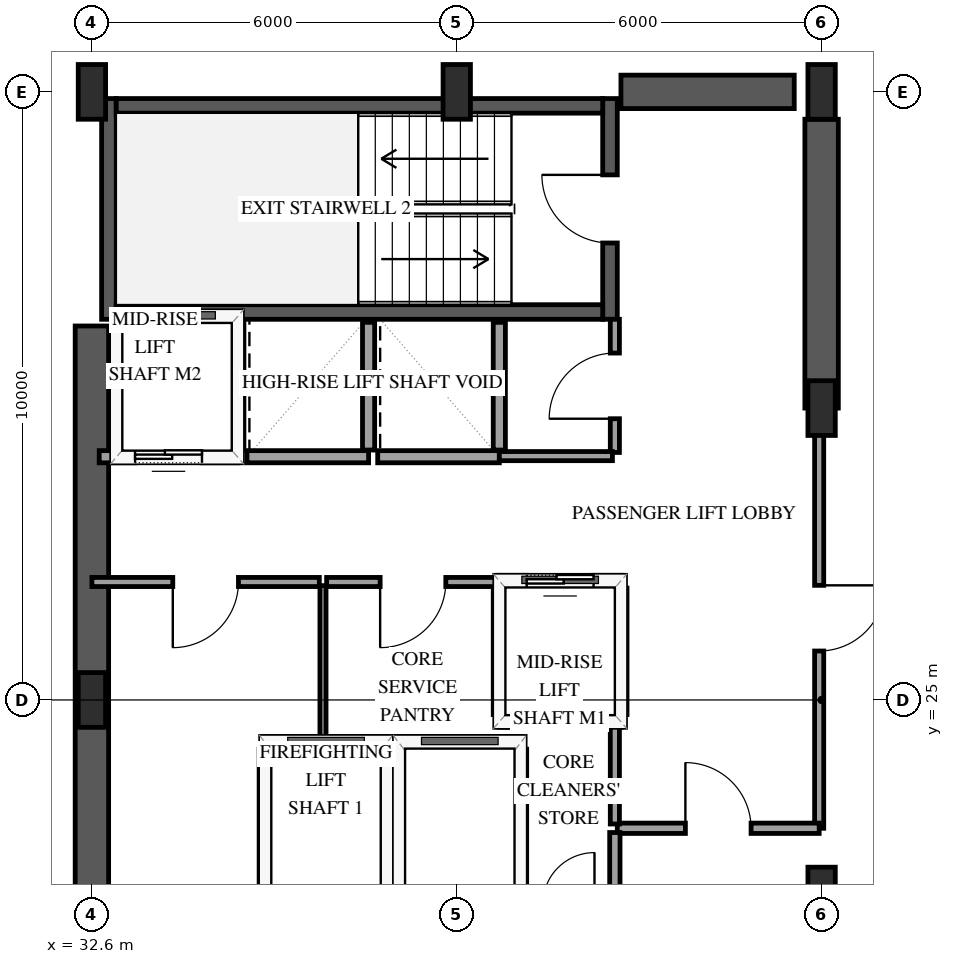
"""IFC4 building model, lengths in metres.
Left out: names, types, materials, properties, quantities, classifications, styles, units other than length and angle.
Written with IfcOpenShell. Run it as: python <this file> out.ifc"""

import sys

from ifc_helpers import new_model, si_unit, direction, frame, frame_2d, origin, origin_2d, place, context, subcontext, project, spatial, rectangle, extrude, element, fill, save


model = new_model("IFC4")
c1 = context("Model", 3, precision=1e-05, world=origin(), true_north=direction((0.0, 1.0)))
c2 = subcontext(c1, "Body", "Model", "MODEL_VIEW")
j1 = project(units=[si_unit("LENGTHUNIT", "METRE"), si_unit("PLANEANGLEUNIT", "RADIAN")], contexts=[c1])
p1 = place(None, origin())
s1 = spatial("IfcSite", under=j1, at=p1, CompositionType="ELEMENT")
p2 = place(p1, origin())
s2 = spatial("IfcBuilding", under=s1, at=p2, CompositionType="ELEMENT")
p3 = place(p2, frame((0.0, 0.0, 149.8)))
s3 = spatial("IfcBuildingStorey", under=s2, at=p3, CompositionType="ELEMENT", Elevation=149.8)
p4 = place(p3, frame((32.88, 31.26, 0.0), z_axis=(0.0, 0.0, 1.0), x_axis=(0.0, 1.0, 0.0)))
e1 = element("IfcWall", 1, at=p4, inside=s3, PredefinedType="SHEAR", context=c2, shape_type="SweptSolid", body=[
    extrude(rectangle(XDim=3.63, YDim=0.24, at=frame_2d((1.815, 0.0))), origin(), (0.0, 0.0, 1.0), 3.6),
])
p5 = place(p3, frame((41.12, 31.26, 0.0), z_axis=(0.0, 0.0, 1.0), x_axis=(0.0, 1.0, 0.0)))
e2 = element("IfcWall", 2, at=p5, inside=s3, PredefinedType="SHEAR", context=c2, shape_type="SweptSolid", body=[
    extrude(rectangle(XDim=3.63, YDim=0.24, at=frame_2d((1.815, 0.0))), origin(), (0.0, 0.0, 1.0), 3.6),
])
p6 = place(p5, frame((1.255, 0.0, 0.0)))
e3 = element("IfcOpeningElement", 3, at=p6, cuts=e2, PredefinedType="OPENING", context=c2, shape_type="SweptSolid", body=[
    extrude(rectangle(XDim=1.12, YDim=2.15, at=frame_2d((0.56, 1.075))), frame((0.0, 0.13, 0.0), z_axis=(0.0, -1.0, 0.0), x_axis=(1.0, 0.0, 0.0)), (0.0, 0.0, 1.0), 0.26),
])
for number, where, z_axis, x_axis in (
    (4, (33.0, 31.38, 0.0), (0.0, 0.0, 1.0), (1.0, 0.0, 0.0)),
    (5, (33.0, 34.77, 0.0), (0.0, 0.0, 1.0), (1.0, 0.0, 0.0)),
):
    element("IfcWall", number, at=place(p3, frame(where, z_axis=z_axis, x_axis=x_axis)), inside=s3, PredefinedType="SHEAR", context=c2, shape_type="SweptSolid", body=[
        extrude(rectangle(XDim=8.0, YDim=0.24, at=frame_2d((4.0, 0.0))), origin(), (0.0, 0.0, 1.0), 3.6),
    ])
p7 = place(p3, frame((32.6, 18.85, 0.0), z_axis=(0.0, 0.0, 1.0), x_axis=(0.0, 1.0, 0.0)))
e6 = element("IfcWall", 6, at=p7, inside=s3, PredefinedType="SHEAR", context=c2, shape_type="SweptSolid", body=[
    extrude(rectangle(XDim=12.3, YDim=0.55, at=frame_2d((6.15, 0.0))), origin(), (0.0, 0.0, 1.0), 3.6),
])
p8 = place(p3, frame((41.3, 35.0, 0.0), z_axis=(0.0, 0.0, 1.0), x_axis=(1.0, 0.0, 0.0)))
e7 = element("IfcWall", 7, at=p8, inside=s3, PredefinedType="SHEAR", context=c2, shape_type="SweptSolid", body=[
    extrude(rectangle(XDim=2.85, YDim=0.55, at=frame_2d((1.425, 0.0))), origin(), (0.0, 0.0, 1.0), 3.6),
])
p9 = place(p3, frame((44.6, 29.8, 0.0), z_axis=(0.0, 0.0, 1.0), x_axis=(0.0, 1.0, 0.0)))
e8 = element("IfcWall", 8, at=p9, inside=s3, PredefinedType="SHEAR", context=c2, shape_type="SweptSolid", body=[
    extrude(rectangle(XDim=4.75, YDim=0.55, at=frame_2d((2.375, 0.0))), origin(), (0.0, 0.0, 1.0), 3.6),
])
for number, where, z_axis, x_axis in (
    (9, (32.6, 25.0, 0.0), (0.0, 0.0, 1.0), (1.0, 0.0, 0.0)),
    (10, (32.6, 35.0, 0.0), (0.0, 0.0, 1.0), (1.0, 0.0, 0.0)),
    (11, (38.6, 35.0, 0.0), (0.0, 0.0, 1.0), (1.0, 0.0, 0.0)),
    (12, (44.6, 21.8, 0.0), (0.0, 0.0, 1.0), (1.0, 0.0, 0.0)),
    (13, (44.6, 29.8, 0.0), (0.0, 0.0, 1.0), (1.0, 0.0, 0.0)),
    (14, (44.6, 35.0, 0.0), (0.0, 0.0, 1.0), (1.0, 0.0, 0.0)),
):
    element("IfcColumn", number, at=place(p3, frame(where, z_axis=z_axis, x_axis=x_axis)), inside=s3, PredefinedType="PILASTER", context=c2, shape_type="SweptSolid", body=[
        extrude(rectangle(XDim=0.45, YDim=0.9, at=origin_2d()), origin(), (0.0, 0.0, 1.0), 3.6),
    ])
p10 = place(p3, frame((32.08, 37.935, 0.0), z_axis=(0.0, 0.0, 1.0), x_axis=(-0.647858622498, -0.761760595762, 0.0)))
e15 = element("IfcWall", 15, at=p10, inside=s3, PredefinedType="SOLIDWALL", context=c2, shape_type="SweptSolid", body=[
    extrude(rectangle(XDim=2.967, YDim=0.27, at=frame_2d((1.483, 0.0))), origin(), (0.0, 0.0, 1.0), 2.679),
])
p11 = place(p3, frame((35.45, 24.3, 0.0), z_axis=(0.0, 0.0, 1.0), x_axis=(1.0, 0.0, 0.0)))
e16 = element("IfcWall", 16, at=p11, inside=s3, PredefinedType="SOLIDWALL", context=c2, shape_type="SweptSolid", body=[
    extrude(rectangle(XDim=2.0, YDim=0.2, at=frame_2d((1.0, 0.0))), origin(), (0.0, 0.0, 1.0), 3.3),
])
for number, where, z_axis, x_axis in (
    (17, (35.45, 21.81, 0.0), (0.0, 0.0, 1.0), (0.0, 1.0, 0.0)),
    (18, (37.45, 21.81, 0.0), (0.0, 0.0, 1.0), (0.0, 1.0, 0.0)),
):
    element("IfcWall", number, at=place(p3, frame(where, z_axis=z_axis, x_axis=x_axis)), inside=s3, PredefinedType="SOLIDWALL", context=c2, shape_type="SweptSolid", body=[
        extrude(rectangle(XDim=2.38, YDim=0.2, at=frame_2d((1.19, 0.0))), origin(), (0.0, 0.0, 1.0), 3.3),
    ])
p12 = place(p3, frame((37.65, 24.3, 0.0), z_axis=(0.0, 0.0, 1.0), x_axis=(1.0, 0.0, 0.0)))
e19 = element("IfcWall", 19, at=p12, inside=s3, PredefinedType="SOLIDWALL", context=c2, shape_type="SweptSolid", body=[
    extrude(rectangle(XDim=2.0, YDim=0.2, at=frame_2d((1.0, 0.0))), origin(), (0.0, 0.0, 1.0), 3.3),
])
p13 = place(p3, frame((39.65, 21.81, 0.0), z_axis=(0.0, 0.0, 1.0), x_axis=(0.0, 1.0, 0.0)))
e20 = element("IfcWall", 20, at=p13, inside=s3, PredefinedType="SOLIDWALL", context=c2, shape_type="SweptSolid", body=[
    extrude(rectangle(XDim=2.38, YDim=0.2, at=frame_2d((1.19, 0.0))), origin(), (0.0, 0.0, 1.0), 3.3),
])
p14 = place(p3, frame((39.3, 24.65, 0.0), z_axis=(0.0, 0.0, 1.0), x_axis=(1.0, 0.0, 0.0)))
e21 = element("IfcWall", 21, at=p14, inside=s3, PredefinedType="SOLIDWALL", context=c2, shape_type="SweptSolid", body=[
    extrude(rectangle(XDim=2.0, YDim=0.2, at=frame_2d((1.0, 0.0))), origin(), (0.0, 0.0, 1.0), 3.3),
])
p15 = place(p3, frame((39.3, 26.95, 0.0), z_axis=(0.0, 0.0, 1.0), x_axis=(1.0, 0.0, 0.0)))
e22 = element("IfcWall", 22, at=p15, inside=s3, PredefinedType="SOLIDWALL", context=c2, shape_type="SweptSolid", body=[
    extrude(rectangle(XDim=2.0, YDim=0.2, at=frame_2d((1.0, 0.0))), origin(), (0.0, 0.0, 1.0), 3.3),
])
p16 = place(p15, frame((0.45, 0.0, 0.0)))
e23 = element("IfcOpeningElement", 23, at=p16, cuts=e22, PredefinedType="OPENING", context=c2, shape_type="SweptSolid", body=[
    extrude(rectangle(XDim=1.1, YDim=2.15, at=frame_2d((0.55, 1.075))), frame((0.0, 0.11, 0.0), z_axis=(0.0, -1.0, 0.0), x_axis=(1.0, 0.0, 0.0)), (0.0, 0.0, 1.0), 0.22),
])
for number, where, z_axis, x_axis in (
    (24, (39.3, 24.76, 0.0), (0.0, 0.0, 1.0), (0.0, 1.0, 0.0)),
    (25, (41.3, 24.76, 0.0), (0.0, 0.0, 1.0), (0.0, 1.0, 0.0)),
):
    element("IfcWall", number, at=place(p3, frame(where, z_axis=z_axis, x_axis=x_axis)), inside=s3, PredefinedType="SOLIDWALL", context=c2, shape_type="SweptSolid", body=[
        extrude(rectangle(XDim=2.08, YDim=0.2, at=frame_2d((1.04, 0.0))), origin(), (0.0, 0.0, 1.0), 3.3),
    ])
p17 = place(p3, frame((32.72, 29.0, 0.0), z_axis=(0.0, 0.0, 1.0), x_axis=(1.0, 0.0, 0.0)))
e26 = element("IfcWall", 26, at=p17, inside=s3, PredefinedType="SOLIDWALL", context=c2, shape_type="SweptSolid", body=[
    extrude(rectangle(XDim=2.28, YDim=0.2, at=frame_2d((1.14, 0.0))), origin(), (0.0, 0.0, 1.0), 3.3),
])
p18 = place(p17, frame((0.59, 0.0, 0.0)))
e27 = element("IfcOpeningElement", 27, at=p18, cuts=e26, PredefinedType="OPENING", context=c2, shape_type="SweptSolid", body=[
    extrude(rectangle(XDim=1.1, YDim=2.15, at=frame_2d((0.55, 1.075))), frame((0.0, 0.11, 0.0), z_axis=(0.0, -1.0, 0.0), x_axis=(1.0, 0.0, 0.0)), (0.0, 0.0, 1.0), 0.22),
])
p19 = place(p3, frame((35.0, 29.11, 0.0), z_axis=(0.0, 0.0, 1.0), x_axis=(0.0, 1.0, 0.0)))
e28 = element("IfcWall", 28, at=p19, inside=s3, PredefinedType="SOLIDWALL", context=c2, shape_type="SweptSolid", body=[
    extrude(rectangle(XDim=2.1, YDim=0.2, at=frame_2d((1.05, 0.0))), origin(), (0.0, 0.0, 1.0), 3.3),
])
p20 = place(p3, frame((35.15, 29.0, 0.0), z_axis=(0.0, 0.0, 1.0), x_axis=(1.0, 0.0, 0.0)))
e29 = element("IfcWall", 29, at=p20, inside=s3, PredefinedType="SOLIDWALL", context=c2, shape_type="SweptSolid", body=[
    extrude(rectangle(XDim=2.0, YDim=0.2, at=frame_2d((1.0, 0.0))), origin(), (0.0, 0.0, 1.0), 3.3),
])
p21 = place(p3, frame((37.15, 29.11, 0.0), z_axis=(0.0, 0.0, 1.0), x_axis=(0.0, 1.0, 0.0)))
e30 = element("IfcWall", 30, at=p21, inside=s3, PredefinedType="SOLIDWALL", context=c2, shape_type="SweptSolid", body=[
    extrude(rectangle(XDim=2.1, YDim=0.2, at=frame_2d((1.05, 0.0))), origin(), (0.0, 0.0, 1.0), 3.3),
])
p22 = place(p3, frame((37.3, 29.0, 0.0), z_axis=(0.0, 0.0, 1.0), x_axis=(1.0, 0.0, 0.0)))
e31 = element("IfcWall", 31, at=p22, inside=s3, PredefinedType="SOLIDWALL", context=c2, shape_type="SweptSolid", body=[
    extrude(rectangle(XDim=2.0, YDim=0.2, at=frame_2d((1.0, 0.0))), origin(), (0.0, 0.0, 1.0), 3.3),
])
p23 = place(p3, frame((39.3, 29.11, 0.0), z_axis=(0.0, 0.0, 1.0), x_axis=(0.0, 1.0, 0.0)))
e32 = element("IfcWall", 32, at=p23, inside=s3, PredefinedType="SOLIDWALL", context=c2, shape_type="SweptSolid", body=[
    extrude(rectangle(XDim=2.1, YDim=0.2, at=frame_2d((1.05, 0.0))), origin(), (0.0, 0.0, 1.0), 3.3),
])
p24 = place(p3, frame((44.56, 29.8, 0.0), z_axis=(0.0, 0.0, 1.0), x_axis=(0.0, -1.0, 0.0)))
e33 = element("IfcWall", 33, at=p24, inside=s3, PredefinedType="PARTITIONING", context=c2, shape_type="SweptSolid", body=[
    extrude(rectangle(XDim=6.91, YDim=0.15, at=frame_2d((3.455, 0.0))), origin(), (0.0, 0.0, 1.0), 2.34),
])
p25 = place(p24, frame((2.915, 0.0, 0.0)))
e34 = element("IfcOpeningElement", 34, at=p25, cuts=e33, PredefinedType="OPENING", context=c2, shape_type="SweptSolid", body=[
    extrude(rectangle(XDim=1.08, YDim=2.15, at=frame_2d((0.54, 1.075))), frame((0.0, 0.085, 0.0), z_axis=(0.0, -1.0, 0.0), x_axis=(1.0, 0.0, 0.0)), (0.0, 0.0, 1.0), 0.17),
])
p26 = place(p3, frame((36.34, 26.94, 0.0), z_axis=(0.0, 0.0, 1.0), x_axis=(-1.0, 0.0, 0.0)))
e35 = element("IfcWall", 35, at=p26, inside=s3, PredefinedType="PARTITIONING", context=c2, shape_type="SweptSolid", body=[
    extrude(rectangle(XDim=3.74, YDim=0.15, at=frame_2d((1.87, 0.0))), origin(), (0.0, 0.0, 1.0), 3.3),
])
p27 = place(p26, frame((1.33, 0.0, 0.0)))
e36 = element("IfcOpeningElement", 36, at=p27, cuts=e35, PredefinedType="OPENING", context=c2, shape_type="SweptSolid", body=[
    extrude(rectangle(XDim=1.08, YDim=2.15, at=frame_2d((0.54, 1.075))), frame((0.0, 0.085, 0.0), z_axis=(0.0, -1.0, 0.0), x_axis=(1.0, 0.0, 0.0)), (0.0, 0.0, 1.0), 0.17),
])
p28 = place(p3, frame((41.24, 22.89, 0.0), z_axis=(0.0, 0.0, 1.0), x_axis=(1.0, 0.0, 0.0)))
e37 = element("IfcWall", 37, at=p28, inside=s3, PredefinedType="PARTITIONING", context=c2, shape_type="SweptSolid", body=[
    extrude(rectangle(XDim=3.32, YDim=0.17, at=frame_2d((1.66, 0.0))), origin(), (0.0, 0.0, 1.0), 3.3),
])
p29 = place(p28, frame((1.12, 0.0, 0.0)))
e38 = element("IfcOpeningElement", 38, at=p29, cuts=e37, PredefinedType="OPENING", context=c2, shape_type="SweptSolid", body=[
    extrude(rectangle(XDim=1.08, YDim=2.15, at=frame_2d((0.54, 1.075))), frame((0.0, 0.095, 0.0), z_axis=(0.0, -1.0, 0.0), x_axis=(1.0, 0.0, 0.0)), (0.0, 0.0, 1.0), 0.19),
])
p30 = place(p3, frame((39.3, 26.94, 0.0), z_axis=(0.0, 0.0, 1.0), x_axis=(-1.0, 0.0, 0.0)))
e39 = element("IfcWall", 39, at=p30, inside=s3, PredefinedType="PARTITIONING", context=c2, shape_type="SweptSolid", body=[
    extrude(rectangle(XDim=2.84, YDim=0.15, at=frame_2d((1.42, 0.0))), origin(), (0.0, 0.0, 1.0), 3.3),
])
p31 = place(p30, frame((0.88, 0.0, 0.0)))
e40 = element("IfcOpeningElement", 40, at=p31, cuts=e39, PredefinedType="OPENING", context=c2, shape_type="SweptSolid", body=[
    extrude(rectangle(XDim=1.08, YDim=2.15, at=frame_2d((0.54, 1.075))), frame((0.0, 0.085, 0.0), z_axis=(0.0, -1.0, 0.0), x_axis=(1.0, 0.0, 0.0)), (0.0, 0.0, 1.0), 0.17),
])
p32 = place(p3, frame((36.4, 26.88, 0.0), z_axis=(0.0, 0.0, 1.0), x_axis=(0.0, -1.0, 0.0)))
e41 = element("IfcWall", 41, at=p32, inside=s3, PredefinedType="PARTITIONING", context=c2, shape_type="SweptSolid", body=[
    extrude(rectangle(XDim=2.58, YDim=0.1, at=frame_2d((1.29, 0.0))), origin(), (0.0, 0.0, 1.0), 3.3),
])
p33 = place(p3, frame((41.2, 29.07, 0.0), z_axis=(0.0, 0.0, 1.0), x_axis=(0.0, 1.0, 0.0)))
e42 = element("IfcWall", 42, at=p33, inside=s3, PredefinedType="PARTITIONING", context=c2, shape_type="SweptSolid", body=[
    extrude(rectangle(XDim=2.19, YDim=0.15, at=frame_2d((1.095, 0.0))), origin(), (0.0, 0.0, 1.0), 3.3),
])
p34 = place(p33, frame((0.555, 0.0, 0.0)))
e43 = element("IfcOpeningElement", 43, at=p34, cuts=e42, PredefinedType="OPENING", context=c2, shape_type="SweptSolid", body=[
    extrude(rectangle(XDim=1.08, YDim=2.15, at=frame_2d((0.54, 1.075))), frame((0.0, 0.085, 0.0), z_axis=(0.0, -1.0, 0.0), x_axis=(1.0, 0.0, 0.0)), (0.0, 0.0, 1.0), 0.17),
])
p35 = place(p3, frame((39.3, 29.01, 0.0), z_axis=(0.0, 0.0, 1.0), x_axis=(1.0, 0.0, 0.0)))
e44 = element("IfcWall", 44, at=p35, inside=s3, PredefinedType="PARTITIONING", context=c2, shape_type="SweptSolid", body=[
    extrude(rectangle(XDim=1.86, YDim=0.15, at=frame_2d((0.93, 0.0))), origin(), (0.0, 0.0, 1.0), 3.3),
])
p36 = place(p3, frame((41.2, 22.96, 0.0), z_axis=(0.0, 0.0, 1.0), x_axis=(0.0, 1.0, 0.0)))
e45 = element("IfcWall", 45, at=p36, inside=s3, PredefinedType="PARTITIONING", context=c2, shape_type="SweptSolid", body=[
    extrude(rectangle(XDim=1.69, YDim=0.15, at=frame_2d((0.845, 0.0))), origin(), (0.0, 0.0, 1.0), 3.3),
])
p37 = place(p3, frame((41.2, 21.7, 0.0), z_axis=(0.0, 0.0, 1.0), x_axis=(0.0, 1.0, 0.0)))
e46 = element("IfcWall", 46, at=p37, inside=s3, PredefinedType="PARTITIONING", context=c2, shape_type="SweptSolid", body=[
    extrude(rectangle(XDim=1.12, YDim=0.17, at=frame_2d((0.56, 0.0))), origin(), (0.0, 0.0, 1.0), 3.3),
])
p38 = place(p16, origin())
e47 = element("IfcDoor", 47, at=p38, inside=s3, OperationType="SLIDING_TO_LEFT", PredefinedType="DOOR", context=c2, shape_type="SweptSolid", body=[
    extrude(rectangle(XDim=1.1, YDim=2.15, at=frame_2d((0.55, 1.075))), frame((0.0, 0.025, 0.0), z_axis=(0.0, -1.0, 0.0), x_axis=(1.0, 0.0, 0.0)), (0.0, 0.0, 1.0), 0.05),
])
fill(e23, e47)
p39 = place(p18, origin())
e48 = element("IfcDoor", 48, at=p39, inside=s3, OperationType="SLIDING_TO_LEFT", PredefinedType="DOOR", context=c2, shape_type="SweptSolid", body=[
    extrude(rectangle(XDim=1.1, YDim=2.15, at=frame_2d((0.55, 1.075))), frame((0.0, 0.025, 0.0), z_axis=(0.0, -1.0, 0.0), x_axis=(1.0, 0.0, 0.0)), (0.0, 0.0, 1.0), 0.05),
])
fill(e27, e48)
p40 = place(p6, origin())
e49 = element("IfcDoor", 49, at=p40, inside=s3, OperationType="SINGLE_SWING_RIGHT", PredefinedType="DOOR", context=c2, shape_type="SweptSolid", body=[
    extrude(rectangle(XDim=1.12, YDim=2.15, at=frame_2d((0.56, 1.075))), frame((0.0, 0.025, 0.0), z_axis=(0.0, -1.0, 0.0), x_axis=(1.0, 0.0, 0.0)), (0.0, 0.0, 1.0), 0.05),
])
fill(e3, e49)
p41 = place(p25, origin())
e50 = element("IfcDoor", 50, at=p41, inside=s3, OperationType="SINGLE_SWING_LEFT", PredefinedType="DOOR", context=c2, shape_type="SweptSolid", body=[
    extrude(rectangle(XDim=1.08, YDim=2.15, at=frame_2d((0.54, 1.075))), frame((0.0, 0.025, 0.0), z_axis=(0.0, -1.0, 0.0), x_axis=(1.0, 0.0, 0.0)), (0.0, 0.0, 1.0), 0.05),
])
fill(e34, e50)
p42 = place(p27, origin())
e51 = element("IfcDoor", 51, at=p42, inside=s3, OperationType="SINGLE_SWING_RIGHT", PredefinedType="DOOR", context=c2, shape_type="SweptSolid", body=[
    extrude(rectangle(XDim=1.08, YDim=2.15, at=frame_2d((0.54, 1.075))), frame((0.0, 0.025, 0.0), z_axis=(0.0, -1.0, 0.0), x_axis=(1.0, 0.0, 0.0)), (0.0, 0.0, 1.0), 0.05),
])
fill(e36, e51)
p43 = place(p29, origin())
e52 = element("IfcDoor", 52, at=p43, inside=s3, OperationType="SINGLE_SWING_LEFT", PredefinedType="DOOR", context=c2, shape_type="SweptSolid", body=[
    extrude(rectangle(XDim=1.08, YDim=2.15, at=frame_2d((0.54, 1.075))), frame((0.0, 0.025, 0.0), z_axis=(0.0, -1.0, 0.0), x_axis=(1.0, 0.0, 0.0)), (0.0, 0.0, 1.0), 0.05),
])
fill(e38, e52)
p44 = place(p31, origin())
e53 = element("IfcDoor", 53, at=p44, inside=s3, OperationType="SINGLE_SWING_RIGHT", PredefinedType="DOOR", context=c2, shape_type="SweptSolid", body=[
    extrude(rectangle(XDim=1.08, YDim=2.15, at=frame_2d((0.54, 1.075))), frame((0.0, 0.025, 0.0), z_axis=(0.0, -1.0, 0.0), x_axis=(1.0, 0.0, 0.0)), (0.0, 0.0, 1.0), 0.05),
])
fill(e40, e53)
p45 = place(p34, origin())
e54 = element("IfcDoor", 54, at=p45, inside=s3, OperationType="SINGLE_SWING_LEFT", PredefinedType="DOOR", context=c2, shape_type="SweptSolid", body=[
    extrude(rectangle(XDim=1.08, YDim=2.15, at=frame_2d((0.54, 1.075))), frame((0.0, 0.025, 0.0), z_axis=(0.0, -1.0, 0.0), x_axis=(1.0, 0.0, 0.0)), (0.0, 0.0, 1.0), 0.05),
])
fill(e43, e54)
save(model, sys.argv[1])
